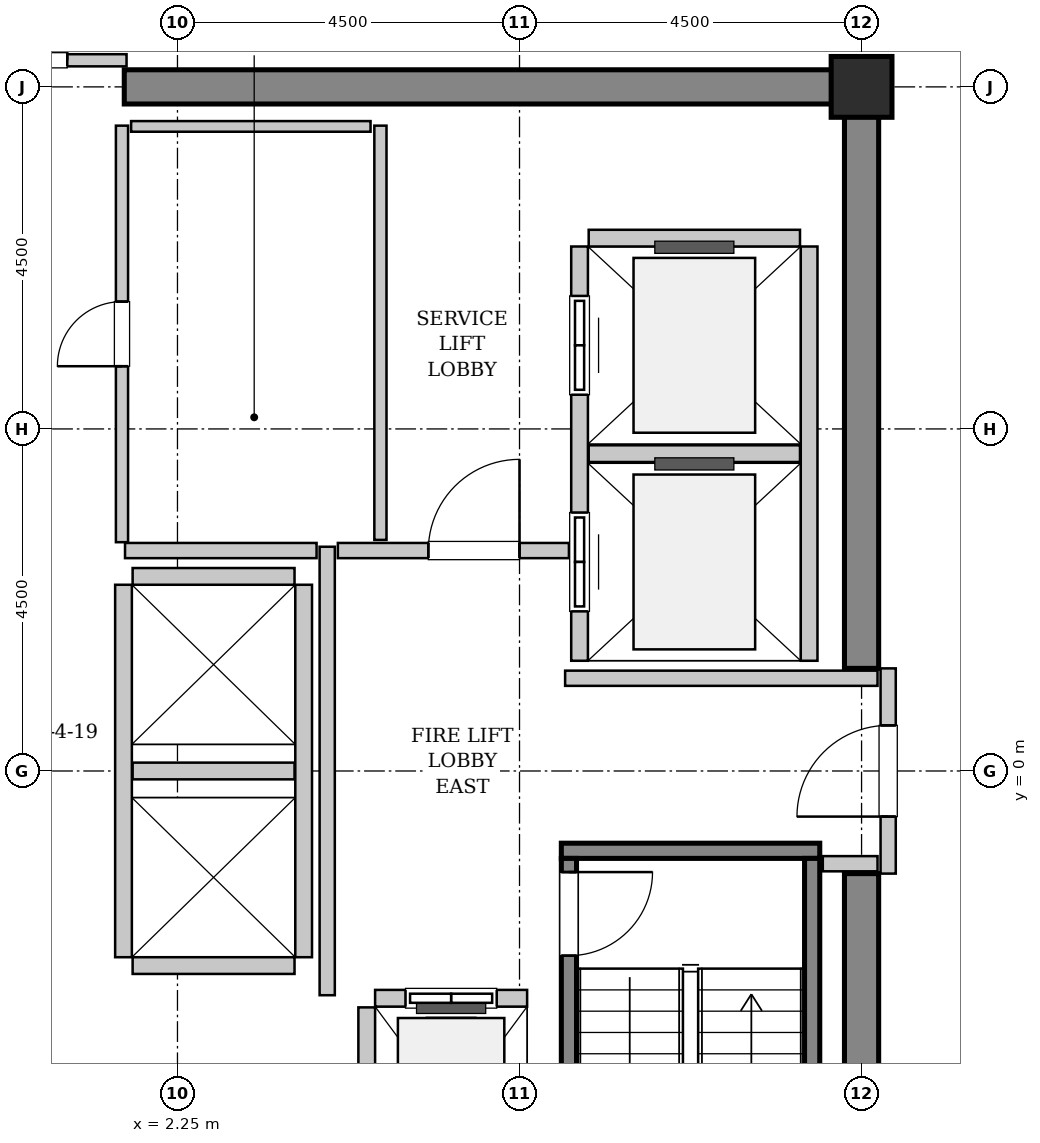
"""IFC4 building model, lengths in metres.
Left out: names, types, materials, properties, quantities, classifications, styles, units other than length and angle.
Written with IfcOpenShell. Run it as: python <this file> out.ifc"""

import sys

from ifc_helpers import new_model, si_unit, direction, frame, frame_2d, origin, origin_2d, place, context, subcontext, project, spatial, rectangle, hollow_rectangle, extrude, source, transform, mapped, element, fill, save


model = new_model("IFC4")
c1 = context("Model", 3, precision=1e-05, world=origin(), true_north=direction((0.0, 1.0)))
c2 = subcontext(c1, "Body", "Model", "MODEL_VIEW")
j1 = project(units=[si_unit("LENGTHUNIT", "METRE"), si_unit("PLANEANGLEUNIT", "RADIAN")], contexts=[c1])
p1 = place(None, origin())
s1 = spatial("IfcSite", under=j1, at=p1, CompositionType="ELEMENT")
p2 = place(p1, origin())
s2 = spatial("IfcBuilding", under=s1, at=p2, CompositionType="ELEMENT")
p3 = place(p2, frame((0.0, 0.0, 256.0)))
s3 = spatial("IfcBuildingStorey", under=s2, at=p3, CompositionType="ELEMENT", Elevation=256.0)
m1 = source(origin(), c2, "Body", "SweptSolid", [
    extrude(rectangle(XDim=9.925, YDim=0.45, at=frame_2d((4.962, 0.0))), origin(), (0.0, 0.0, 1.0), 3.8),
])
p4 = place(p3, frame((1.55, 9.0, 0.0), z_axis=(0.0, 0.0, 1.0), x_axis=(1.0, 0.0, 0.0)))
e1 = element("IfcWall", 1, at=p4, inside=s3, PredefinedType="SHEAR", context=c2, shape_type="MappedRepresentation", body=[
    mapped(m1, transform((0.0, 0.0, 0.0), x_axis=(1.0, 0.0, 0.0), y_axis=(0.0, 1.0, 0.0), z_axis=(0.0, 0.0, 1.0), scale=1.0)),
])
m2 = source(origin(), c2, "Body", "SweptSolid", [
    extrude(rectangle(XDim=7.425, YDim=0.45, at=frame_2d((3.712, 0.0))), origin(), (0.0, 0.0, 1.0), 3.8),
])
for number, where, z_axis, x_axis in (
    (2, (11.25, -8.775, 0.0), (0.0, 0.0, 1.0), (0.0, 1.0, 0.0)),
    (3, (11.25, 1.35, 0.0), (0.0, 0.0, 1.0), (0.0, 1.0, 0.0)),
):
    element("IfcWall", number, at=place(p3, frame(where, z_axis=z_axis, x_axis=x_axis)), inside=s3, PredefinedType="SHEAR", context=c2, shape_type="MappedRepresentation", body=[
        mapped(m2, transform((0.0, 0.0, 0.0), x_axis=(1.0, 0.0, 0.0), y_axis=(0.0, 1.0, 0.0), z_axis=(0.0, 0.0, 1.0), scale=1.0)),
    ])
m3 = source(origin(), c2, "Body", "SweptSolid", [
    extrude(hollow_rectangle(XDim=0.8, YDim=0.8, WallThickness=0.04, InnerFilletRadius=0.04, OuterFilletRadius=0.08, at=origin_2d()), origin(), (0.0, 0.0, 1.0), 3.8),
])
p5 = place(p3, frame((11.25, 9.0, 0.0), z_axis=(0.0, 0.0, 1.0), x_axis=(1.0, 0.0, 0.0)))
e4 = element("IfcColumn", 4, at=p5, inside=s3, PredefinedType="COLUMN", context=c2, shape_type="MappedRepresentation", body=[
    mapped(m3, transform((0.0, 0.0, 0.0), x_axis=(1.0, 0.0, 0.0), y_axis=(0.0, 1.0, 0.0), z_axis=(0.0, 0.0, 1.0), scale=1.0)),
])
m4 = source(origin(), c2, "Body", "SweptSolid", [
    extrude(rectangle(XDim=3.4, YDim=0.2, at=frame_2d((1.7, 0.0))), origin(), (0.0, 0.0, 1.0), 3.8),
])
p6 = place(p3, frame((7.3, -1.05, 0.0), z_axis=(0.0, 0.0, 1.0), x_axis=(1.0, 0.0, 0.0)))
e5 = element("IfcWall", 5, at=p6, inside=s3, PredefinedType="SOLIDWALL", context=c2, shape_type="MappedRepresentation", body=[
    mapped(m4, transform((0.0, 0.0, 0.0), x_axis=(1.0, 0.0, 0.0), y_axis=(0.0, 1.0, 0.0), z_axis=(0.0, 0.0, 1.0), scale=1.0)),
])
m5 = source(origin(), c2, "Body", "SweptSolid", [
    extrude(rectangle(XDim=7.1, YDim=0.2, at=frame_2d((3.55, 0.0))), origin(), (0.0, 0.0, 1.0), 3.8),
])
p7 = place(p3, frame((7.4, -1.15, 0.0), z_axis=(0.0, 0.0, 1.0), x_axis=(0.0, -1.0, 0.0)))
e6 = element("IfcWall", 6, at=p7, inside=s3, PredefinedType="SOLIDWALL", context=c2, shape_type="MappedRepresentation", body=[
    mapped(m5, transform((0.0, 0.0, 0.0), x_axis=(1.0, 0.0, 0.0), y_axis=(0.0, 1.0, 0.0), z_axis=(0.0, 0.0, 1.0), scale=1.0)),
])
p8 = place(p7, frame((0.18, 0.0, 0.0)))
e7 = element("IfcOpeningElement", 7, at=p8, cuts=e6, PredefinedType="OPENING", context=c2, shape_type="SweptSolid", body=[
    extrude(rectangle(XDim=1.1, YDim=2.15, at=frame_2d((0.55, 1.075))), frame((0.0, 0.11, 0.0), z_axis=(0.0, -1.0, 0.0), x_axis=(1.0, 0.0, 0.0)), (0.0, 0.0, 1.0), 0.22),
])
p9 = place(p3, frame((10.6, -1.15, 0.0), z_axis=(0.0, 0.0, 1.0), x_axis=(0.0, -1.0, 0.0)))
e8 = element("IfcWall", 8, at=p9, inside=s3, PredefinedType="SOLIDWALL", context=c2, shape_type="MappedRepresentation", body=[
    mapped(m5, transform((0.0, 0.0, 0.0), x_axis=(1.0, 0.0, 0.0), y_axis=(0.0, 1.0, 0.0), z_axis=(0.0, 0.0, 1.0), scale=1.0)),
])
m6 = source(origin(), c2, "Body", "SweptSolid", [
    extrude(rectangle(XDim=2.0, YDim=0.22, at=frame_2d((1.0, 0.0))), origin(), (0.0, 0.0, 1.0), 3.485),
])
p10 = place(p3, frame((6.85, -2.99, 0.0), z_axis=(0.0, 0.0, 1.0), x_axis=(-1.0, 0.0, 0.0)))
e9 = element("IfcWall", 9, at=p10, inside=s3, PredefinedType="SOLIDWALL", context=c2, shape_type="MappedRepresentation", body=[
    mapped(m6, transform((0.0, 0.0, 0.0), x_axis=(1.0, 0.0, 0.0), y_axis=(0.0, 1.0, 0.0), z_axis=(0.0, 0.0, 1.0), scale=1.0)),
])
p11 = place(p10, frame((0.4, 0.0, 0.0)))
e10 = element("IfcOpeningElement", 10, at=p11, cuts=e9, PredefinedType="OPENING", context=c2, shape_type="SweptSolid", body=[
    extrude(rectangle(XDim=1.2, YDim=2.2, at=frame_2d((0.6, 1.1))), frame((0.0, 0.12, 0.0), z_axis=(0.0, -1.0, 0.0), x_axis=(1.0, 0.0, 0.0)), (0.0, 0.0, 1.0), 0.24),
])
m7 = source(origin(), c2, "Body", "SweptSolid", [
    extrude(rectangle(XDim=2.68, YDim=0.22, at=frame_2d((1.34, 0.0))), origin(), (0.0, 0.0, 1.0), 3.485),
])
p12 = place(p3, frame((4.74, -3.11, 0.0), z_axis=(0.0, 0.0, 1.0), x_axis=(0.0, -1.0, 0.0)))
e11 = element("IfcWall", 11, at=p12, inside=s3, PredefinedType="SOLIDWALL", context=c2, shape_type="MappedRepresentation", body=[
    mapped(m7, transform((0.0, 0.0, 0.0), x_axis=(1.0, 0.0, 0.0), y_axis=(0.0, 1.0, 0.0), z_axis=(0.0, 0.0, 1.0), scale=1.0)),
])
m8 = source(origin(), c2, "Body", "SweptSolid", [
    extrude(rectangle(XDim=5.45, YDim=0.22, at=frame_2d((2.725, 0.0))), origin(), (0.0, 0.0, 1.0), 3.485),
])
p13 = place(p3, frame((7.54, 6.9, 0.0), z_axis=(0.0, 0.0, 1.0), x_axis=(0.0, -1.0, 0.0)))
e12 = element("IfcWall", 12, at=p13, inside=s3, PredefinedType="SOLIDWALL", context=c2, shape_type="MappedRepresentation", body=[
    mapped(m8, transform((0.0, 0.0, 0.0), x_axis=(1.0, 0.0, 0.0), y_axis=(0.0, 1.0, 0.0), z_axis=(0.0, 0.0, 1.0), scale=1.0)),
])
p14 = place(p13, frame((3.5, 0.0, 0.0)))
e13 = element("IfcOpeningElement", 13, at=p14, cuts=e12, PredefinedType="OPENING", context=c2, shape_type="SweptSolid", body=[
    extrude(rectangle(XDim=1.3, YDim=2.3, at=frame_2d((0.65, 1.15))), frame((0.0, 0.12, 0.0), z_axis=(0.0, -1.0, 0.0), x_axis=(1.0, 0.0, 0.0)), (0.0, 0.0, 1.0), 0.24),
])
p15 = place(p13, frame((0.65, 0.0, 0.0)))
e14 = element("IfcOpeningElement", 14, at=p15, cuts=e12, PredefinedType="OPENING", context=c2, shape_type="SweptSolid", body=[
    extrude(rectangle(XDim=1.3, YDim=2.3, at=frame_2d((0.65, 1.15))), frame((0.0, 0.12, 0.0), z_axis=(0.0, -1.0, 0.0), x_axis=(1.0, 0.0, 0.0)), (0.0, 0.0, 1.0), 0.24),
])
p16 = place(p3, frame((10.56, 1.45, 0.0), z_axis=(0.0, 0.0, 1.0), x_axis=(0.0, 1.0, 0.0)))
e15 = element("IfcWall", 15, at=p16, inside=s3, PredefinedType="SOLIDWALL", context=c2, shape_type="MappedRepresentation", body=[
    mapped(m8, transform((0.0, 0.0, 0.0), x_axis=(1.0, 0.0, 0.0), y_axis=(0.0, 1.0, 0.0), z_axis=(0.0, 0.0, 1.0), scale=1.0)),
])
m9 = source(origin(), c2, "Body", "SweptSolid", [
    extrude(rectangle(XDim=2.78, YDim=0.22, at=frame_2d((1.39, 0.0))), origin(), (0.0, 0.0, 1.0), 3.485),
])
for number, where, z_axis, x_axis in (
    (16, (7.66, 4.175, 0.0), (0.0, 0.0, 1.0), (1.0, 0.0, 0.0)),
    (17, (10.44, 7.01, 0.0), (0.0, 0.0, 1.0), (-1.0, 0.0, 0.0)),
):
    element("IfcWall", number, at=place(p3, frame(where, z_axis=z_axis, x_axis=x_axis)), inside=s3, PredefinedType="SOLIDWALL", context=c2, shape_type="MappedRepresentation", body=[
        mapped(m9, transform((0.0, 0.0, 0.0), x_axis=(1.0, 0.0, 0.0), y_axis=(0.0, 1.0, 0.0), z_axis=(0.0, 0.0, 1.0), scale=1.0)),
    ])
m10 = source(origin(), c2, "Body", "SweptSolid", [
    extrude(rectangle(XDim=4.9, YDim=0.22, at=frame_2d((2.45, 0.0))), origin(), (0.0, 0.0, 1.0), 3.485),
])
for number, where, z_axis, x_axis in (
    (18, (1.54, 2.45, 0.0), (0.0, 0.0, 1.0), (0.0, -1.0, 0.0)),
    (19, (3.91, -2.45, 0.0), (0.0, 0.0, 1.0), (0.0, 1.0, 0.0)),
):
    element("IfcWall", number, at=place(p3, frame(where, z_axis=z_axis, x_axis=x_axis)), inside=s3, PredefinedType="SOLIDWALL", context=c2, shape_type="MappedRepresentation", body=[
        mapped(m10, transform((0.0, 0.0, 0.0), x_axis=(1.0, 0.0, 0.0), y_axis=(0.0, 1.0, 0.0), z_axis=(0.0, 0.0, 1.0), scale=1.0)),
    ])
m11 = source(origin(), c2, "Body", "SweptSolid", [
    extrude(rectangle(XDim=2.13, YDim=0.22, at=frame_2d((1.065, 0.0))), origin(), (0.0, 0.0, 1.0), 3.485),
])
for number, where, z_axis, x_axis in (
    (20, (1.66, -2.56, 0.0), (0.0, 0.0, 1.0), (1.0, 0.0, 0.0)),
    (21, (1.66, 0.0, 0.0), (0.0, 0.0, 1.0), (1.0, 0.0, 0.0)),
    (22, (3.79, 2.56, 0.0), (0.0, 0.0, 1.0), (-1.0, 0.0, 0.0)),
):
    element("IfcWall", number, at=place(p3, frame(where, z_axis=z_axis, x_axis=x_axis)), inside=s3, PredefinedType="SOLIDWALL", context=c2, shape_type="MappedRepresentation", body=[
        mapped(m11, transform((0.0, 0.0, 0.0), x_axis=(1.0, 0.0, 0.0), y_axis=(0.0, 1.0, 0.0), z_axis=(0.0, 0.0, 1.0), scale=1.0)),
    ])
m12 = source(origin(), c2, "Body", "SweptSolid", [
    extrude(rectangle(XDim=2.7, YDim=0.2, at=frame_2d((1.35, 0.0))), origin(), (0.0, 0.0, 1.0), 2.575),
])
p17 = place(p3, frame((11.6, -1.35, 0.0), z_axis=(0.0, 0.0, 1.0), x_axis=(0.0, 1.0, 0.0)))
e23 = element("IfcWall", 23, at=p17, inside=s3, PredefinedType="PARTITIONING", context=c2, shape_type="MappedRepresentation", body=[
    mapped(m12, transform((0.0, 0.0, 0.0), x_axis=(1.0, 0.0, 0.0), y_axis=(0.0, 1.0, 0.0), z_axis=(0.0, 0.0, 1.0), scale=1.0)),
])
p18 = place(p17, frame((0.75, 0.0, 0.0)))
e24 = element("IfcOpeningElement", 24, at=p18, cuts=e23, PredefinedType="OPENING", context=c2, shape_type="SweptSolid", body=[
    extrude(rectangle(XDim=1.2, YDim=2.15, at=frame_2d((0.6, 1.075))), frame((0.0, 0.11, 0.0), z_axis=(0.0, -1.0, 0.0), x_axis=(1.0, 0.0, 0.0)), (0.0, 0.0, 1.0), 0.22),
])
m13 = source(origin(), c2, "Body", "SweptSolid", [
    extrude(rectangle(XDim=5.9, YDim=0.2, at=frame_2d((2.95, 0.0))), origin(), (0.0, 0.0, 1.0), 3.485),
])
p19 = place(p3, frame((4.22, -2.95, 0.0), z_axis=(0.0, 0.0, 1.0), x_axis=(0.0, 1.0, 0.0)))
e25 = element("IfcWall", 25, at=p19, inside=s3, PredefinedType="PARTITIONING", context=c2, shape_type="MappedRepresentation", body=[
    mapped(m13, transform((0.0, 0.0, 0.0), x_axis=(1.0, 0.0, 0.0), y_axis=(0.0, 1.0, 0.0), z_axis=(0.0, 0.0, 1.0), scale=1.0)),
])
m14 = source(origin(), c2, "Body", "SweptSolid", [
    extrude(rectangle(XDim=2.52, YDim=0.2, at=frame_2d((1.26, 0.0))), origin(), (0.0, 0.0, 1.0), 3.485),
])
p20 = place(p3, frame((1.56, 2.9, 0.0), z_axis=(0.0, 0.0, 1.0), x_axis=(1.0, 0.0, 0.0)))
e26 = element("IfcWall", 26, at=p20, inside=s3, PredefinedType="PARTITIONING", context=c2, shape_type="MappedRepresentation", body=[
    mapped(m14, transform((0.0, 0.0, 0.0), x_axis=(1.0, 0.0, 0.0), y_axis=(0.0, 1.0, 0.0), z_axis=(0.0, 0.0, 1.0), scale=1.0)),
])
m15 = source(origin(), c2, "Body", "SweptSolid", [
    extrude(rectangle(XDim=3.04, YDim=0.2, at=frame_2d((1.52, 0.0))), origin(), (0.0, 0.0, 1.0), 3.485),
])
p21 = place(p3, frame((4.36, 2.9, 0.0), z_axis=(0.0, 0.0, 1.0), x_axis=(1.0, 0.0, 0.0)))
e27 = element("IfcWall", 27, at=p21, inside=s3, PredefinedType="PARTITIONING", context=c2, shape_type="MappedRepresentation", body=[
    mapped(m15, transform((0.0, 0.0, 0.0), x_axis=(1.0, 0.0, 0.0), y_axis=(0.0, 1.0, 0.0), z_axis=(0.0, 0.0, 1.0), scale=1.0)),
])
p22 = place(p21, frame((1.19, 0.0, 0.0)))
e28 = element("IfcOpeningElement", 28, at=p22, cuts=e27, PredefinedType="OPENING", context=c2, shape_type="SweptSolid", body=[
    extrude(rectangle(XDim=1.2, YDim=2.15, at=frame_2d((0.6, 1.075))), frame((0.0, 0.11, 0.0), z_axis=(0.0, -1.0, 0.0), x_axis=(1.0, 0.0, 0.0)), (0.0, 0.0, 1.0), 0.22),
])
m16 = source(origin(), c2, "Body", "SweptSolid", [
    extrude(rectangle(XDim=4.11, YDim=0.2, at=frame_2d((2.055, 0.0))), origin(), (0.0, 0.0, 1.0), 3.485),
])
p23 = place(p3, frame((7.35, 1.22, 0.0), z_axis=(0.0, 0.0, 1.0), x_axis=(1.0, 0.0, 0.0)))
e29 = element("IfcWall", 29, at=p23, inside=s3, PredefinedType="PARTITIONING", context=c2, shape_type="MappedRepresentation", body=[
    mapped(m16, transform((0.0, 0.0, 0.0), x_axis=(1.0, 0.0, 0.0), y_axis=(0.0, 1.0, 0.0), z_axis=(0.0, 0.0, 1.0), scale=1.0)),
])
m17 = source(origin(), c2, "Body", "SweptSolid", [
    extrude(rectangle(XDim=0.72, YDim=0.2, at=frame_2d((0.36, 0.0))), origin(), (0.0, 0.0, 1.0), 3.485),
])
p24 = place(p3, frame((10.74, -1.22, 0.0), z_axis=(0.0, 0.0, 1.0), x_axis=(1.0, 0.0, 0.0)))
e30 = element("IfcWall", 30, at=p24, inside=s3, PredefinedType="PARTITIONING", context=c2, shape_type="MappedRepresentation", body=[
    mapped(m17, transform((0.0, 0.0, 0.0), x_axis=(1.0, 0.0, 0.0), y_axis=(0.0, 1.0, 0.0), z_axis=(0.0, 0.0, 1.0), scale=1.0)),
])
m18 = source(origin(), c2, "Body", "SweptSolid", [
    extrude(rectangle(XDim=3.16, YDim=0.16, at=frame_2d((1.58, 0.0))), origin(), (0.0, 0.0, 1.0), 2.575),
])
p25 = place(p3, frame((-1.58, 9.35, 0.0), z_axis=(0.0, 0.0, 1.0), x_axis=(1.0, 0.0, 0.0)))
e31 = element("IfcWall", 31, at=p25, inside=s3, PredefinedType="PARTITIONING", context=c2, shape_type="MappedRepresentation", body=[
    mapped(m18, transform((0.0, 0.0, 0.0), x_axis=(1.0, 0.0, 0.0), y_axis=(0.0, 1.0, 0.0), z_axis=(0.0, 0.0, 1.0), scale=1.0)),
])
p26 = place(p25, frame((0.78, 0.0, 0.0)))
e32 = element("IfcOpeningElement", 32, at=p26, cuts=e31, PredefinedType="OPENING", context=c2, shape_type="SweptSolid", body=[
    extrude(rectangle(XDim=1.6, YDim=2.3, at=frame_2d((0.8, 1.15))), frame((0.0, 0.09, 0.0), z_axis=(0.0, -1.0, 0.0), x_axis=(1.0, 0.0, 0.0)), (0.0, 0.0, 1.0), 0.18),
])
m19 = source(origin(), c2, "Body", "SweptSolid", [
    extrude(rectangle(XDim=5.45, YDim=0.16, at=frame_2d((2.725, 0.0))), origin(), (0.0, 0.0, 1.0), 3.485),
])
p27 = place(p3, frame((4.92, 3.04, 0.0), z_axis=(0.0, 0.0, 1.0), x_axis=(0.0, 1.0, 0.0)))
e33 = element("IfcWall", 33, at=p27, inside=s3, PredefinedType="PARTITIONING", context=c2, shape_type="MappedRepresentation", body=[
    mapped(m19, transform((0.0, 0.0, 0.0), x_axis=(1.0, 0.0, 0.0), y_axis=(0.0, 1.0, 0.0), z_axis=(0.0, 0.0, 1.0), scale=1.0)),
])
m20 = source(origin(), c2, "Body", "SweptSolid", [
    extrude(rectangle(XDim=5.48, YDim=0.16, at=frame_2d((2.74, 0.0))), origin(), (0.0, 0.0, 1.0), 3.485),
])
p28 = place(p3, frame((1.52, 3.01, 0.0), z_axis=(0.0, 0.0, 1.0), x_axis=(0.0, 1.0, 0.0)))
e34 = element("IfcWall", 34, at=p28, inside=s3, PredefinedType="PARTITIONING", context=c2, shape_type="MappedRepresentation", body=[
    mapped(m20, transform((0.0, 0.0, 0.0), x_axis=(1.0, 0.0, 0.0), y_axis=(0.0, 1.0, 0.0), z_axis=(0.0, 0.0, 1.0), scale=1.0)),
])
p29 = place(p28, frame((2.315, 0.0, 0.0)))
e35 = element("IfcOpeningElement", 35, at=p29, cuts=e34, PredefinedType="OPENING", context=c2, shape_type="SweptSolid", body=[
    extrude(rectangle(XDim=0.85, YDim=2.1, at=frame_2d((0.425, 1.05))), frame((0.0, 0.09, 0.0), z_axis=(0.0, -1.0, 0.0), x_axis=(1.0, 0.0, 0.0)), (0.0, 0.0, 1.0), 0.18),
])
m21 = source(origin(), c2, "Body", "SweptSolid", [
    extrude(rectangle(XDim=3.15, YDim=0.14, at=frame_2d((1.575, 0.0))), origin(), (0.0, 0.0, 1.0), 3.485),
])
p30 = place(p3, frame((1.64, 8.48, 0.0), z_axis=(0.0, 0.0, 1.0), x_axis=(1.0, 0.0, 0.0)))
e36 = element("IfcWall", 36, at=p30, inside=s3, PredefinedType="PARTITIONING", context=c2, shape_type="MappedRepresentation", body=[
    mapped(m21, transform((0.0, 0.0, 0.0), x_axis=(1.0, 0.0, 0.0), y_axis=(0.0, 1.0, 0.0), z_axis=(0.0, 0.0, 1.0), scale=1.0)),
])
m22 = source(origin(), c2, "Body", "SweptSolid", [
    extrude(rectangle(XDim=1.1, YDim=2.15, at=frame_2d((0.55, 1.075))), frame((0.0, 0.025, 0.0), z_axis=(0.0, -1.0, 0.0), x_axis=(1.0, 0.0, 0.0)), (0.0, 0.0, 1.0), 0.05),
])
p31 = place(p8, origin())
e37 = element("IfcDoor", 37, at=p31, inside=s3, OperationType="SINGLE_SWING_LEFT", PredefinedType="DOOR", context=c2, shape_type="MappedRepresentation", body=[
    mapped(m22, transform((0.0, 0.0, 0.0), x_axis=(1.0, 0.0, 0.0), y_axis=(0.0, 1.0, 0.0), z_axis=(0.0, 0.0, 1.0), scale=1.0)),
])
fill(e7, e37)
m23 = source(origin(), c2, "Body", "SweptSolid", [
    extrude(rectangle(XDim=1.2, YDim=2.2, at=frame_2d((0.6, 1.1))), frame((0.0, 0.025, 0.0), z_axis=(0.0, -1.0, 0.0), x_axis=(1.0, 0.0, 0.0)), (0.0, 0.0, 1.0), 0.05),
])
p32 = place(p11, origin())
e38 = element("IfcDoor", 38, at=p32, inside=s3, OperationType="SLIDING_TO_LEFT", PredefinedType="DOOR", context=c2, shape_type="MappedRepresentation", body=[
    mapped(m23, transform((0.0, 0.0, 0.0), x_axis=(1.0, 0.0, 0.0), y_axis=(0.0, 1.0, 0.0), z_axis=(0.0, 0.0, 1.0), scale=1.0)),
])
fill(e10, e38)
m24 = source(origin(), c2, "Body", "SweptSolid", [
    extrude(rectangle(XDim=1.3, YDim=2.3, at=frame_2d((0.65, 1.15))), frame((0.0, 0.025, 0.0), z_axis=(0.0, -1.0, 0.0), x_axis=(1.0, 0.0, 0.0)), (0.0, 0.0, 1.0), 0.05),
])
p33 = place(p14, origin())
e39 = element("IfcDoor", 39, at=p33, inside=s3, OperationType="SLIDING_TO_RIGHT", PredefinedType="DOOR", context=c2, shape_type="MappedRepresentation", body=[
    mapped(m24, transform((0.0, 0.0, 0.0), x_axis=(1.0, 0.0, 0.0), y_axis=(0.0, 1.0, 0.0), z_axis=(0.0, 0.0, 1.0), scale=1.0)),
])
fill(e13, e39)
p34 = place(p15, origin())
e40 = element("IfcDoor", 40, at=p34, inside=s3, OperationType="SLIDING_TO_RIGHT", PredefinedType="DOOR", context=c2, shape_type="MappedRepresentation", body=[
    mapped(m24, transform((0.0, 0.0, 0.0), x_axis=(1.0, 0.0, 0.0), y_axis=(0.0, 1.0, 0.0), z_axis=(0.0, 0.0, 1.0), scale=1.0)),
])
fill(e14, e40)
m25 = source(origin(), c2, "Body", "SweptSolid", [
    extrude(rectangle(XDim=1.2, YDim=2.15, at=frame_2d((0.6, 1.075))), frame((0.0, 0.025, 0.0), z_axis=(0.0, -1.0, 0.0), x_axis=(1.0, 0.0, 0.0)), (0.0, 0.0, 1.0), 0.05),
])
p35 = place(p18, origin())
e41 = element("IfcDoor", 41, at=p35, inside=s3, OperationType="SINGLE_SWING_LEFT", PredefinedType="DOOR", context=c2, shape_type="MappedRepresentation", body=[
    mapped(m25, transform((0.0, 0.0, 0.0), x_axis=(1.0, 0.0, 0.0), y_axis=(0.0, 1.0, 0.0), z_axis=(0.0, 0.0, 1.0), scale=1.0)),
])
fill(e24, e41)
p36 = place(p22, origin())
e42 = element("IfcDoor", 42, at=p36, inside=s3, OperationType="SINGLE_SWING_RIGHT", PredefinedType="DOOR", context=c2, shape_type="MappedRepresentation", body=[
    mapped(m25, transform((0.0, 0.0, 0.0), x_axis=(1.0, 0.0, 0.0), y_axis=(0.0, 1.0, 0.0), z_axis=(0.0, 0.0, 1.0), scale=1.0)),
])
fill(e28, e42)
m26 = source(origin(), c2, "Body", "SweptSolid", [
    extrude(rectangle(XDim=1.6, YDim=2.3, at=frame_2d((0.8, 1.15))), frame((0.0, 0.025, 0.0), z_axis=(0.0, -1.0, 0.0), x_axis=(1.0, 0.0, 0.0)), (0.0, 0.0, 1.0), 0.05),
])
p37 = place(p26, origin())
e43 = element("IfcDoor", 43, at=p37, inside=s3, OperationType="DOUBLE_DOOR_SINGLE_SWING", PredefinedType="DOOR", context=c2, shape_type="MappedRepresentation", body=[
    mapped(m26, transform((0.0, 0.0, 0.0), x_axis=(1.0, 0.0, 0.0), y_axis=(0.0, 1.0, 0.0), z_axis=(0.0, 0.0, 1.0), scale=1.0)),
])
fill(e32, e43)
m27 = source(origin(), c2, "Body", "SweptSolid", [
    extrude(rectangle(XDim=0.85, YDim=2.1, at=frame_2d((0.425, 1.05))), frame((0.0, 0.025, 0.0), z_axis=(0.0, -1.0, 0.0), x_axis=(1.0, 0.0, 0.0)), (0.0, 0.0, 1.0), 0.05),
])
p38 = place(p29, origin())
e44 = element("IfcDoor", 44, at=p38, inside=s3, OperationType="SINGLE_SWING_LEFT", PredefinedType="DOOR", context=c2, shape_type="MappedRepresentation", body=[
    mapped(m27, transform((0.0, 0.0, 0.0), x_axis=(1.0, 0.0, 0.0), y_axis=(0.0, 1.0, 0.0), z_axis=(0.0, 0.0, 1.0), scale=1.0)),
])
fill(e35, e44)
save(model, sys.argv[1])
